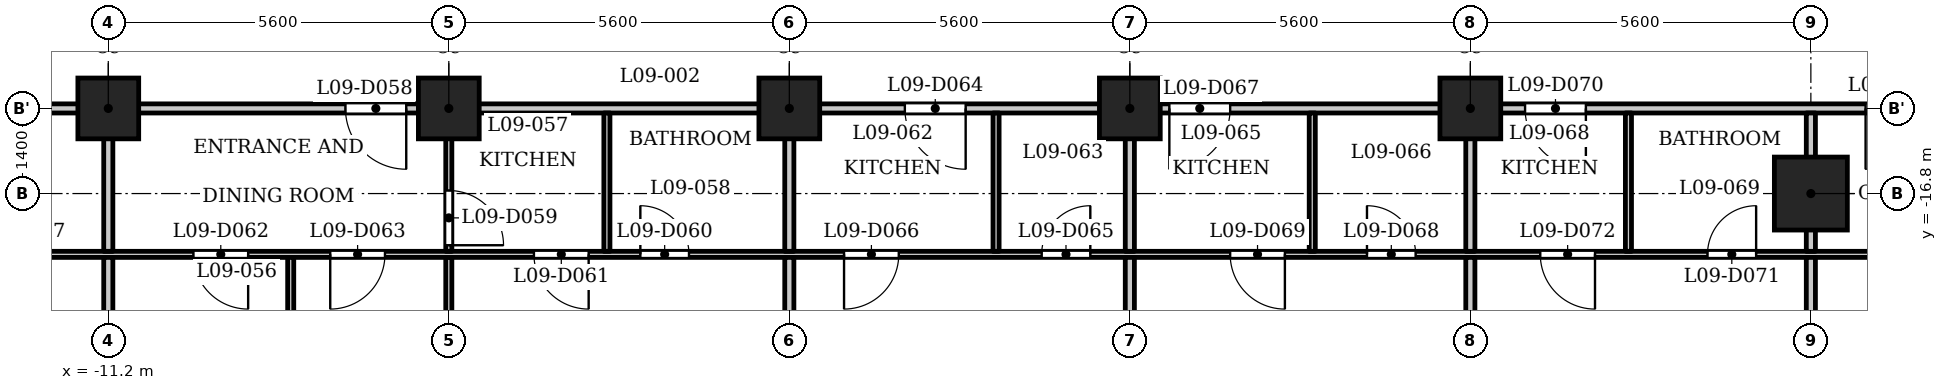
"""IFC4 building model, lengths in metres.
Left out: names, types, materials, properties, quantities, classifications, styles, units other than length and angle.
Written with IfcOpenShell. Run it as: python <this file> out.ifc"""

import sys

from ifc_helpers import new_model, si_unit, direction, frame, frame_2d, origin, origin_2d, place, context, subcontext, project, spatial, rectangle, extrude, element, fill, save


model = new_model("IFC4")
c1 = context("Model", 3, precision=1e-05, world=origin(), true_north=direction((0.0, 1.0)))
c2 = subcontext(c1, "Body", "Model", "MODEL_VIEW")
j1 = project(units=[si_unit("LENGTHUNIT", "METRE"), si_unit("PLANEANGLEUNIT", "RADIAN")], contexts=[c1])
p1 = place(None, origin())
s1 = spatial("IfcSite", under=j1, at=p1, CompositionType="ELEMENT")
p2 = place(p1, origin())
s2 = spatial("IfcBuilding", under=s1, at=p2, CompositionType="ELEMENT")
p3 = place(p2, frame((0.0, 0.0, 41.0)))
s3 = spatial("IfcBuildingStorey", under=s2, at=p3, CompositionType="ELEMENT", Elevation=41.0)
p4 = place(p3, frame((16.8, -16.8, 0.0), z_axis=(0.0, 0.0, 1.0), x_axis=(1.0, 0.0, 0.0)))
e1 = element("IfcColumn", 1, at=p4, inside=s3, PredefinedType="COLUMN", context=c2, shape_type="SweptSolid", body=[
    extrude(rectangle(XDim=1.2, YDim=1.2, at=origin_2d()), origin(), (0.0, 0.0, 1.0), 3.5),
])
for number, where, z_axis, x_axis in (
    (2, (-11.2, -15.4, 0.0), (0.0, 0.0, 1.0), (1.0, 0.0, 0.0)),
    (3, (-5.6, -15.4, 0.0), (0.0, 0.0, 1.0), (1.0, 0.0, 0.0)),
    (4, (0.0, -15.4, 0.0), (0.0, 0.0, 1.0), (1.0, 0.0, 0.0)),
    (5, (5.6, -15.4, 0.0), (0.0, 0.0, 1.0), (1.0, 0.0, 0.0)),
    (6, (11.2, -15.4, 0.0), (0.0, 0.0, 1.0), (1.0, 0.0, 0.0)),
):
    element("IfcColumn", number, at=place(p3, frame(where, z_axis=z_axis, x_axis=x_axis)), inside=s3, PredefinedType="COLUMN", context=c2, shape_type="SweptSolid", body=[
        extrude(rectangle(XDim=1.0, YDim=1.0, at=origin_2d()), origin(), (0.0, 0.0, 1.0), 3.5),
    ])
p5 = place(p3, frame((-26.394, -17.8, 0.0), z_axis=(0.0, 0.0, 1.0), x_axis=(1.0, 0.0, 0.0)))
e7 = element("IfcWall", 7, at=p5, inside=s3, PredefinedType="PARTITIONING", context=c2, shape_type="SweptSolid", body=[
    extrude(rectangle(XDim=53.126, YDim=0.1, at=frame_2d((26.563, 0.0))), origin(), (0.0, 0.0, 1.0), 3.2),
])
p6 = place(p5, frame((0.794, 0.0, 0.0)))
e8 = element("IfcOpeningElement", 8, at=p6, cuts=e7, PredefinedType="OPENING", context=c2, shape_type="SweptSolid", body=[
    extrude(rectangle(XDim=0.8, YDim=2.1, at=frame_2d((0.4, 1.05))), frame((0.0, 0.06, 0.0), z_axis=(0.0, -1.0, 0.0), x_axis=(1.0, 0.0, 0.0)), (0.0, 0.0, 1.0), 0.12),
])
p7 = place(p5, frame((5.644, 0.0, 0.0)))
e9 = element("IfcOpeningElement", 9, at=p7, cuts=e7, PredefinedType="OPENING", context=c2, shape_type="SweptSolid", body=[
    extrude(rectangle(XDim=0.9, YDim=2.1, at=frame_2d((0.45, 1.05))), frame((0.0, 0.06, 0.0), z_axis=(0.0, -1.0, 0.0), x_axis=(1.0, 0.0, 0.0)), (0.0, 0.0, 1.0), 0.12),
])
p8 = place(p5, frame((10.394, 0.0, 0.0)))
e10 = element("IfcOpeningElement", 10, at=p8, cuts=e7, PredefinedType="OPENING", context=c2, shape_type="SweptSolid", body=[
    extrude(rectangle(XDim=0.8, YDim=2.1, at=frame_2d((0.4, 1.05))), frame((0.0, 0.06, 0.0), z_axis=(0.0, -1.0, 0.0), x_axis=(1.0, 0.0, 0.0)), (0.0, 0.0, 1.0), 0.12),
])
p9 = place(p5, frame((13.244, 0.0, 0.0)))
e11 = element("IfcOpeningElement", 11, at=p9, cuts=e7, PredefinedType="OPENING", context=c2, shape_type="SweptSolid", body=[
    extrude(rectangle(XDim=0.9, YDim=2.1, at=frame_2d((0.45, 1.05))), frame((0.0, 0.06, 0.0), z_axis=(0.0, -1.0, 0.0), x_axis=(1.0, 0.0, 0.0)), (0.0, 0.0, 1.0), 0.12),
])
p10 = place(p5, frame((23.944, 0.0, 0.0)))
e12 = element("IfcOpeningElement", 12, at=p10, cuts=e7, PredefinedType="OPENING", context=c2, shape_type="SweptSolid", body=[
    extrude(rectangle(XDim=0.8, YDim=2.1, at=frame_2d((0.4, 1.05))), frame((0.0, 0.06, 0.0), z_axis=(0.0, -1.0, 0.0), x_axis=(1.0, 0.0, 0.0)), (0.0, 0.0, 1.0), 0.12),
])
p11 = place(p5, frame((22.194, 0.0, 0.0)))
e13 = element("IfcOpeningElement", 13, at=p11, cuts=e7, PredefinedType="OPENING", context=c2, shape_type="SweptSolid", body=[
    extrude(rectangle(XDim=0.9, YDim=2.1, at=frame_2d((0.45, 1.05))), frame((0.0, 0.06, 0.0), z_axis=(0.0, -1.0, 0.0), x_axis=(1.0, 0.0, 0.0)), (0.0, 0.0, 1.0), 0.12),
])
p12 = place(p5, frame((16.594, 0.0, 0.0)))
e14 = element("IfcOpeningElement", 14, at=p12, cuts=e7, PredefinedType="OPENING", context=c2, shape_type="SweptSolid", body=[
    extrude(rectangle(XDim=0.9, YDim=2.1, at=frame_2d((0.45, 1.05))), frame((0.0, 0.06, 0.0), z_axis=(0.0, -1.0, 0.0), x_axis=(1.0, 0.0, 0.0)), (0.0, 0.0, 1.0), 0.12),
])
p13 = place(p5, frame((18.844, 0.0, 0.0)))
e15 = element("IfcOpeningElement", 15, at=p13, cuts=e7, PredefinedType="OPENING", context=c2, shape_type="SweptSolid", body=[
    extrude(rectangle(XDim=0.9, YDim=2.1, at=frame_2d((0.45, 1.05))), frame((0.0, 0.06, 0.0), z_axis=(0.0, -1.0, 0.0), x_axis=(1.0, 0.0, 0.0)), (0.0, 0.0, 1.0), 0.12),
])
p14 = place(p5, frame((30.544, 0.0, 0.0)))
e16 = element("IfcOpeningElement", 16, at=p14, cuts=e7, PredefinedType="OPENING", context=c2, shape_type="SweptSolid", body=[
    extrude(rectangle(XDim=0.8, YDim=2.1, at=frame_2d((0.4, 1.05))), frame((0.0, 0.06, 0.0), z_axis=(0.0, -1.0, 0.0), x_axis=(1.0, 0.0, 0.0)), (0.0, 0.0, 1.0), 0.12),
])
p15 = place(p5, frame((27.294, 0.0, 0.0)))
e17 = element("IfcOpeningElement", 17, at=p15, cuts=e7, PredefinedType="OPENING", context=c2, shape_type="SweptSolid", body=[
    extrude(rectangle(XDim=0.9, YDim=2.1, at=frame_2d((0.45, 1.05))), frame((0.0, 0.06, 0.0), z_axis=(0.0, -1.0, 0.0), x_axis=(1.0, 0.0, 0.0)), (0.0, 0.0, 1.0), 0.12),
])
p16 = place(p5, frame((35.894, 0.0, 0.0)))
e18 = element("IfcOpeningElement", 18, at=p16, cuts=e7, PredefinedType="OPENING", context=c2, shape_type="SweptSolid", body=[
    extrude(rectangle(XDim=0.8, YDim=2.1, at=frame_2d((0.4, 1.05))), frame((0.0, 0.06, 0.0), z_axis=(0.0, -1.0, 0.0), x_axis=(1.0, 0.0, 0.0)), (0.0, 0.0, 1.0), 0.12),
])
p17 = place(p5, frame((33.644, 0.0, 0.0)))
e19 = element("IfcOpeningElement", 19, at=p17, cuts=e7, PredefinedType="OPENING", context=c2, shape_type="SweptSolid", body=[
    extrude(rectangle(XDim=0.9, YDim=2.1, at=frame_2d((0.45, 1.05))), frame((0.0, 0.06, 0.0), z_axis=(0.0, -1.0, 0.0), x_axis=(1.0, 0.0, 0.0)), (0.0, 0.0, 1.0), 0.12),
])
p18 = place(p5, frame((41.494, 0.0, 0.0)))
e20 = element("IfcOpeningElement", 20, at=p18, cuts=e7, PredefinedType="OPENING", context=c2, shape_type="SweptSolid", body=[
    extrude(rectangle(XDim=0.8, YDim=2.1, at=frame_2d((0.4, 1.05))), frame((0.0, 0.06, 0.0), z_axis=(0.0, -1.0, 0.0), x_axis=(1.0, 0.0, 0.0)), (0.0, 0.0, 1.0), 0.12),
])
p19 = place(p5, frame((38.744, 0.0, 0.0)))
e21 = element("IfcOpeningElement", 21, at=p19, cuts=e7, PredefinedType="OPENING", context=c2, shape_type="SweptSolid", body=[
    extrude(rectangle(XDim=0.9, YDim=2.1, at=frame_2d((0.45, 1.05))), frame((0.0, 0.06, 0.0), z_axis=(0.0, -1.0, 0.0), x_axis=(1.0, 0.0, 0.0)), (0.0, 0.0, 1.0), 0.12),
])
p20 = place(p5, frame((49.362, 0.0, 0.0)))
e22 = element("IfcOpeningElement", 22, at=p20, cuts=e7, PredefinedType="OPENING", context=c2, shape_type="SweptSolid", body=[
    extrude(rectangle(XDim=0.8, YDim=2.1, at=frame_2d((0.4, 1.05))), frame((0.0, 0.06, 0.0), z_axis=(0.0, -1.0, 0.0), x_axis=(1.0, 0.0, 0.0)), (0.0, 0.0, 1.0), 0.12),
])
p21 = place(p5, frame((45.094, 0.0, 0.0)))
e23 = element("IfcOpeningElement", 23, at=p21, cuts=e7, PredefinedType="OPENING", context=c2, shape_type="SweptSolid", body=[
    extrude(rectangle(XDim=0.9, YDim=2.1, at=frame_2d((0.45, 1.05))), frame((0.0, 0.06, 0.0), z_axis=(0.0, -1.0, 0.0), x_axis=(1.0, 0.0, 0.0)), (0.0, 0.0, 1.0), 0.12),
])
p22 = place(p3, frame((-27.484, -15.4, 0.0), z_axis=(0.0, 0.0, 1.0), x_axis=(1.0, 0.0, 0.0)))
e24 = element("IfcWall", 24, at=p22, inside=s3, PredefinedType="PARTITIONING", context=c2, shape_type="SweptSolid", body=[
    extrude(rectangle(XDim=54.968, YDim=0.15, at=frame_2d((27.484, 0.0))), origin(), (0.0, 0.0, 1.0), 3.2),
])
p23 = place(p22, frame((5.734, 0.0, 0.0)))
e25 = element("IfcOpeningElement", 25, at=p23, cuts=e24, PredefinedType="OPENING", context=c2, shape_type="SweptSolid", body=[
    extrude(rectangle(XDim=1.0, YDim=2.1, at=frame_2d((0.5, 1.05))), frame((0.0, 0.085, 0.0), z_axis=(0.0, -1.0, 0.0), x_axis=(1.0, 0.0, 0.0)), (0.0, 0.0, 1.0), 0.17),
])
p24 = place(p22, frame((13.334, 0.0, 0.0)))
e26 = element("IfcOpeningElement", 26, at=p24, cuts=e24, PredefinedType="OPENING", context=c2, shape_type="SweptSolid", body=[
    extrude(rectangle(XDim=1.0, YDim=2.1, at=frame_2d((0.5, 1.05))), frame((0.0, 0.085, 0.0), z_axis=(0.0, -1.0, 0.0), x_axis=(1.0, 0.0, 0.0)), (0.0, 0.0, 1.0), 0.17),
])
p25 = place(p22, frame((20.184, 0.0, 0.0)))
e27 = element("IfcOpeningElement", 27, at=p25, cuts=e24, PredefinedType="OPENING", context=c2, shape_type="SweptSolid", body=[
    extrude(rectangle(XDim=1.0, YDim=2.1, at=frame_2d((0.5, 1.05))), frame((0.0, 0.085, 0.0), z_axis=(0.0, -1.0, 0.0), x_axis=(1.0, 0.0, 0.0)), (0.0, 0.0, 1.0), 0.17),
])
p26 = place(p22, frame((29.384, 0.0, 0.0)))
e28 = element("IfcOpeningElement", 28, at=p26, cuts=e24, PredefinedType="OPENING", context=c2, shape_type="SweptSolid", body=[
    extrude(rectangle(XDim=1.0, YDim=2.1, at=frame_2d((0.5, 1.05))), frame((0.0, 0.085, 0.0), z_axis=(0.0, -1.0, 0.0), x_axis=(1.0, 0.0, 0.0)), (0.0, 0.0, 1.0), 0.17),
])
p27 = place(p22, frame((33.734, 0.0, 0.0)))
e29 = element("IfcOpeningElement", 29, at=p27, cuts=e24, PredefinedType="OPENING", context=c2, shape_type="SweptSolid", body=[
    extrude(rectangle(XDim=1.0, YDim=2.1, at=frame_2d((0.5, 1.05))), frame((0.0, 0.085, 0.0), z_axis=(0.0, -1.0, 0.0), x_axis=(1.0, 0.0, 0.0)), (0.0, 0.0, 1.0), 0.17),
])
p28 = place(p22, frame((39.584, 0.0, 0.0)))
e30 = element("IfcOpeningElement", 30, at=p28, cuts=e24, PredefinedType="OPENING", context=c2, shape_type="SweptSolid", body=[
    extrude(rectangle(XDim=1.0, YDim=2.1, at=frame_2d((0.5, 1.05))), frame((0.0, 0.085, 0.0), z_axis=(0.0, -1.0, 0.0), x_axis=(1.0, 0.0, 0.0)), (0.0, 0.0, 1.0), 0.17),
])
p29 = place(p22, frame((45.184, 0.0, 0.0)))
e31 = element("IfcOpeningElement", 31, at=p29, cuts=e24, PredefinedType="OPENING", context=c2, shape_type="SweptSolid", body=[
    extrude(rectangle(XDim=1.0, YDim=2.1, at=frame_2d((0.5, 1.05))), frame((0.0, 0.085, 0.0), z_axis=(0.0, -1.0, 0.0), x_axis=(1.0, 0.0, 0.0)), (0.0, 0.0, 1.0), 0.17),
])
p30 = place(p3, frame((-11.2, -23.13, 0.0), z_axis=(0.0, 0.0, 1.0), x_axis=(0.0, 1.0, 0.0)))
e32 = element("IfcWall", 32, at=p30, inside=s3, PredefinedType="PARTITIONING", context=c2, shape_type="SweptSolid", body=[
    extrude(rectangle(XDim=5.28, YDim=0.15, at=frame_2d((2.64, 0.0))), origin(), (0.0, 0.0, 1.0), 3.2),
])
p31 = place(p3, frame((-11.2, -17.75, 0.0), z_axis=(0.0, 0.0, 1.0), x_axis=(0.0, 1.0, 0.0)))
e33 = element("IfcWall", 33, at=p31, inside=s3, PredefinedType="PARTITIONING", context=c2, shape_type="SweptSolid", body=[
    extrude(rectangle(XDim=2.275, YDim=0.15, at=frame_2d((1.137, 0.0))), origin(), (0.0, 0.0, 1.0), 3.2),
])
p32 = place(p3, frame((-8.2, -22.08, 0.0), z_axis=(0.0, 0.0, 1.0), x_axis=(0.0, 1.0, 0.0)))
e34 = element("IfcWall", 34, at=p32, inside=s3, PredefinedType="PARTITIONING", context=c2, shape_type="SweptSolid", body=[
    extrude(rectangle(XDim=4.23, YDim=0.1, at=frame_2d((2.115, 0.0))), origin(), (0.0, 0.0, 1.0), 3.2),
])
p33 = place(p3, frame((-5.6, -23.13, 0.0), z_axis=(0.0, 0.0, 1.0), x_axis=(0.0, 1.0, 0.0)))
e35 = element("IfcWall", 35, at=p33, inside=s3, PredefinedType="PARTITIONING", context=c2, shape_type="SweptSolid", body=[
    extrude(rectangle(XDim=5.28, YDim=0.1, at=frame_2d((2.64, 0.0))), origin(), (0.0, 0.0, 1.0), 3.2),
])
p34 = place(p3, frame((-5.6, -17.75, 0.0), z_axis=(0.0, 0.0, 1.0), x_axis=(0.0, 1.0, 0.0)))
e36 = element("IfcWall", 36, at=p34, inside=s3, PredefinedType="PARTITIONING", context=c2, shape_type="SweptSolid", body=[
    extrude(rectangle(XDim=2.275, YDim=0.1, at=frame_2d((1.137, 0.0))), origin(), (0.0, 0.0, 1.0), 3.2),
])
p35 = place(p34, frame((0.1, 0.0, 0.0)))
e37 = element("IfcOpeningElement", 37, at=p35, cuts=e36, PredefinedType="OPENING", context=c2, shape_type="SweptSolid", body=[
    extrude(rectangle(XDim=0.9, YDim=2.1, at=frame_2d((0.45, 1.05))), frame((0.0, 0.06, 0.0), z_axis=(0.0, -1.0, 0.0), x_axis=(1.0, 0.0, 0.0)), (0.0, 0.0, 1.0), 0.12),
])
p36 = place(p3, frame((-3.0, -17.75, 0.0), z_axis=(0.0, 0.0, 1.0), x_axis=(0.0, 1.0, 0.0)))
e38 = element("IfcWall", 38, at=p36, inside=s3, PredefinedType="PARTITIONING", context=c2, shape_type="SweptSolid", body=[
    extrude(rectangle(XDim=2.275, YDim=0.1, at=frame_2d((1.137, 0.0))), origin(), (0.0, 0.0, 1.0), 3.2),
])
p37 = place(p3, frame((0.0, -23.13, 0.0), z_axis=(0.0, 0.0, 1.0), x_axis=(0.0, 1.0, 0.0)))
e39 = element("IfcWall", 39, at=p37, inside=s3, PredefinedType="PARTITIONING", context=c2, shape_type="SweptSolid", body=[
    extrude(rectangle(XDim=5.28, YDim=0.15, at=frame_2d((2.64, 0.0))), origin(), (0.0, 0.0, 1.0), 3.2),
])
p38 = place(p3, frame((0.0, -17.75, 0.0), z_axis=(0.0, 0.0, 1.0), x_axis=(0.0, 1.0, 0.0)))
e40 = element("IfcWall", 40, at=p38, inside=s3, PredefinedType="PARTITIONING", context=c2, shape_type="SweptSolid", body=[
    extrude(rectangle(XDim=2.275, YDim=0.15, at=frame_2d((1.137, 0.0))), origin(), (0.0, 0.0, 1.0), 3.2),
])
p39 = place(p3, frame((3.4, -17.75, 0.0), z_axis=(0.0, 0.0, 1.0), x_axis=(0.0, 1.0, 0.0)))
e41 = element("IfcWall", 41, at=p39, inside=s3, PredefinedType="PARTITIONING", context=c2, shape_type="SweptSolid", body=[
    extrude(rectangle(XDim=2.275, YDim=0.1, at=frame_2d((1.137, 0.0))), origin(), (0.0, 0.0, 1.0), 3.2),
])
p40 = place(p3, frame((5.6, -23.13, 0.0), z_axis=(0.0, 0.0, 1.0), x_axis=(0.0, 1.0, 0.0)))
e42 = element("IfcWall", 42, at=p40, inside=s3, PredefinedType="PARTITIONING", context=c2, shape_type="SweptSolid", body=[
    extrude(rectangle(XDim=5.28, YDim=0.15, at=frame_2d((2.64, 0.0))), origin(), (0.0, 0.0, 1.0), 3.2),
])
p41 = place(p3, frame((5.6, -17.75, 0.0), z_axis=(0.0, 0.0, 1.0), x_axis=(0.0, 1.0, 0.0)))
e43 = element("IfcWall", 43, at=p41, inside=s3, PredefinedType="PARTITIONING", context=c2, shape_type="SweptSolid", body=[
    extrude(rectangle(XDim=2.275, YDim=0.15, at=frame_2d((1.137, 0.0))), origin(), (0.0, 0.0, 1.0), 3.2),
])
p42 = place(p3, frame((8.6, -17.75, 0.0), z_axis=(0.0, 0.0, 1.0), x_axis=(0.0, 1.0, 0.0)))
e44 = element("IfcWall", 44, at=p42, inside=s3, PredefinedType="PARTITIONING", context=c2, shape_type="SweptSolid", body=[
    extrude(rectangle(XDim=2.275, YDim=0.1, at=frame_2d((1.137, 0.0))), origin(), (0.0, 0.0, 1.0), 3.2),
])
p43 = place(p3, frame((11.2, -23.13, 0.0), z_axis=(0.0, 0.0, 1.0), x_axis=(0.0, 1.0, 0.0)))
e45 = element("IfcWall", 45, at=p43, inside=s3, PredefinedType="PARTITIONING", context=c2, shape_type="SweptSolid", body=[
    extrude(rectangle(XDim=5.28, YDim=0.15, at=frame_2d((2.64, 0.0))), origin(), (0.0, 0.0, 1.0), 3.2),
])
p44 = place(p3, frame((11.2, -17.75, 0.0), z_axis=(0.0, 0.0, 1.0), x_axis=(0.0, 1.0, 0.0)))
e46 = element("IfcWall", 46, at=p44, inside=s3, PredefinedType="PARTITIONING", context=c2, shape_type="SweptSolid", body=[
    extrude(rectangle(XDim=2.275, YDim=0.15, at=frame_2d((1.137, 0.0))), origin(), (0.0, 0.0, 1.0), 3.2),
])
p45 = place(p3, frame((13.8, -17.75, 0.0), z_axis=(0.0, 0.0, 1.0), x_axis=(0.0, 1.0, 0.0)))
e47 = element("IfcWall", 47, at=p45, inside=s3, PredefinedType="PARTITIONING", context=c2, shape_type="SweptSolid", body=[
    extrude(rectangle(XDim=2.275, YDim=0.1, at=frame_2d((1.137, 0.0))), origin(), (0.0, 0.0, 1.0), 3.2),
])
p46 = place(p3, frame((16.8, -23.13, 0.0), z_axis=(0.0, 0.0, 1.0), x_axis=(0.0, 1.0, 0.0)))
e48 = element("IfcWall", 48, at=p46, inside=s3, PredefinedType="PARTITIONING", context=c2, shape_type="SweptSolid", body=[
    extrude(rectangle(XDim=5.28, YDim=0.15, at=frame_2d((2.64, 0.0))), origin(), (0.0, 0.0, 1.0), 3.2),
])
p47 = place(p3, frame((16.8, -17.75, 0.0), z_axis=(0.0, 0.0, 1.0), x_axis=(0.0, 1.0, 0.0)))
e49 = element("IfcWall", 49, at=p47, inside=s3, PredefinedType="PARTITIONING", context=c2, shape_type="SweptSolid", body=[
    extrude(rectangle(XDim=2.275, YDim=0.15, at=frame_2d((1.137, 0.0))), origin(), (0.0, 0.0, 1.0), 3.2),
])
p48 = place(p25, origin())
e50 = element("IfcDoor", 50, at=p48, inside=s3, OperationType="SINGLE_SWING_RIGHT", PredefinedType="DOOR", context=c2, shape_type="SweptSolid", body=[
    extrude(rectangle(XDim=1.0, YDim=2.1, at=frame_2d((0.5, 1.05))), frame((0.0, 0.025, 0.0), z_axis=(0.0, -1.0, 0.0), x_axis=(1.0, 0.0, 0.0)), (0.0, 0.0, 1.0), 0.05),
])
fill(e27, e50)
p49 = place(p35, origin())
e51 = element("IfcDoor", 51, at=p49, inside=s3, OperationType="SINGLE_SWING_LEFT", PredefinedType="DOOR", context=c2, shape_type="SweptSolid", body=[
    extrude(rectangle(XDim=0.9, YDim=2.1, at=frame_2d((0.45, 1.05))), frame((0.0, 0.025, 0.0), z_axis=(0.0, -1.0, 0.0), x_axis=(1.0, 0.0, 0.0)), (0.0, 0.0, 1.0), 0.05),
])
fill(e37, e51)
p50 = place(p10, origin())
e52 = element("IfcDoor", 52, at=p50, inside=s3, OperationType="SINGLE_SWING_RIGHT", PredefinedType="DOOR", context=c2, shape_type="SweptSolid", body=[
    extrude(rectangle(XDim=0.8, YDim=2.1, at=frame_2d((0.4, 1.05))), frame((0.0, 0.025, 0.0), z_axis=(0.0, -1.0, 0.0), x_axis=(1.0, 0.0, 0.0)), (0.0, 0.0, 1.0), 0.05),
])
fill(e12, e52)
p51 = place(p11, origin())
e53 = element("IfcDoor", 53, at=p51, inside=s3, OperationType="SINGLE_SWING_RIGHT", PredefinedType="DOOR", context=c2, shape_type="SweptSolid", body=[
    extrude(rectangle(XDim=0.9, YDim=2.1, at=frame_2d((0.45, 1.05))), frame((0.0, 0.025, 0.0), z_axis=(0.0, -1.0, 0.0), x_axis=(1.0, 0.0, 0.0)), (0.0, 0.0, 1.0), 0.05),
])
fill(e13, e53)
p52 = place(p12, origin())
e54 = element("IfcDoor", 54, at=p52, inside=s3, OperationType="SINGLE_SWING_RIGHT", PredefinedType="DOOR", context=c2, shape_type="SweptSolid", body=[
    extrude(rectangle(XDim=0.9, YDim=2.1, at=frame_2d((0.45, 1.05))), frame((0.0, 0.025, 0.0), z_axis=(0.0, -1.0, 0.0), x_axis=(1.0, 0.0, 0.0)), (0.0, 0.0, 1.0), 0.05),
])
fill(e14, e54)
p53 = place(p13, origin())
e55 = element("IfcDoor", 55, at=p53, inside=s3, OperationType="SINGLE_SWING_LEFT", PredefinedType="DOOR", context=c2, shape_type="SweptSolid", body=[
    extrude(rectangle(XDim=0.9, YDim=2.1, at=frame_2d((0.45, 1.05))), frame((0.0, 0.025, 0.0), z_axis=(0.0, -1.0, 0.0), x_axis=(1.0, 0.0, 0.0)), (0.0, 0.0, 1.0), 0.05),
])
fill(e15, e55)
p54 = place(p26, origin())
e56 = element("IfcDoor", 56, at=p54, inside=s3, OperationType="SINGLE_SWING_RIGHT", PredefinedType="DOOR", context=c2, shape_type="SweptSolid", body=[
    extrude(rectangle(XDim=1.0, YDim=2.1, at=frame_2d((0.5, 1.05))), frame((0.0, 0.025, 0.0), z_axis=(0.0, -1.0, 0.0), x_axis=(1.0, 0.0, 0.0)), (0.0, 0.0, 1.0), 0.05),
])
fill(e28, e56)
p55 = place(p14, origin())
e57 = element("IfcDoor", 57, at=p55, inside=s3, OperationType="SINGLE_SWING_LEFT", PredefinedType="DOOR", context=c2, shape_type="SweptSolid", body=[
    extrude(rectangle(XDim=0.8, YDim=2.1, at=frame_2d((0.4, 1.05))), frame((0.0, 0.025, 0.0), z_axis=(0.0, -1.0, 0.0), x_axis=(1.0, 0.0, 0.0)), (0.0, 0.0, 1.0), 0.05),
])
fill(e16, e57)
p56 = place(p15, origin())
e58 = element("IfcDoor", 58, at=p56, inside=s3, OperationType="SINGLE_SWING_LEFT", PredefinedType="DOOR", context=c2, shape_type="SweptSolid", body=[
    extrude(rectangle(XDim=0.9, YDim=2.1, at=frame_2d((0.45, 1.05))), frame((0.0, 0.025, 0.0), z_axis=(0.0, -1.0, 0.0), x_axis=(1.0, 0.0, 0.0)), (0.0, 0.0, 1.0), 0.05),
])
fill(e17, e58)
p57 = place(p27, origin())
e59 = element("IfcDoor", 59, at=p57, inside=s3, OperationType="SINGLE_SWING_LEFT", PredefinedType="DOOR", context=c2, shape_type="SweptSolid", body=[
    extrude(rectangle(XDim=1.0, YDim=2.1, at=frame_2d((0.5, 1.05))), frame((0.0, 0.025, 0.0), z_axis=(0.0, -1.0, 0.0), x_axis=(1.0, 0.0, 0.0)), (0.0, 0.0, 1.0), 0.05),
])
fill(e29, e59)
p58 = place(p16, origin())
e60 = element("IfcDoor", 60, at=p58, inside=s3, OperationType="SINGLE_SWING_RIGHT", PredefinedType="DOOR", context=c2, shape_type="SweptSolid", body=[
    extrude(rectangle(XDim=0.8, YDim=2.1, at=frame_2d((0.4, 1.05))), frame((0.0, 0.025, 0.0), z_axis=(0.0, -1.0, 0.0), x_axis=(1.0, 0.0, 0.0)), (0.0, 0.0, 1.0), 0.05),
])
fill(e18, e60)
p59 = place(p17, origin())
e61 = element("IfcDoor", 61, at=p59, inside=s3, OperationType="SINGLE_SWING_RIGHT", PredefinedType="DOOR", context=c2, shape_type="SweptSolid", body=[
    extrude(rectangle(XDim=0.9, YDim=2.1, at=frame_2d((0.45, 1.05))), frame((0.0, 0.025, 0.0), z_axis=(0.0, -1.0, 0.0), x_axis=(1.0, 0.0, 0.0)), (0.0, 0.0, 1.0), 0.05),
])
fill(e19, e61)
p60 = place(p28, origin())
e62 = element("IfcDoor", 62, at=p60, inside=s3, OperationType="SINGLE_SWING_RIGHT", PredefinedType="DOOR", context=c2, shape_type="SweptSolid", body=[
    extrude(rectangle(XDim=1.0, YDim=2.1, at=frame_2d((0.5, 1.05))), frame((0.0, 0.025, 0.0), z_axis=(0.0, -1.0, 0.0), x_axis=(1.0, 0.0, 0.0)), (0.0, 0.0, 1.0), 0.05),
])
fill(e30, e62)
p61 = place(p18, origin())
e63 = element("IfcDoor", 63, at=p61, inside=s3, OperationType="SINGLE_SWING_LEFT", PredefinedType="DOOR", context=c2, shape_type="SweptSolid", body=[
    extrude(rectangle(XDim=0.8, YDim=2.1, at=frame_2d((0.4, 1.05))), frame((0.0, 0.025, 0.0), z_axis=(0.0, -1.0, 0.0), x_axis=(1.0, 0.0, 0.0)), (0.0, 0.0, 1.0), 0.05),
])
fill(e20, e63)
p62 = place(p19, origin())
e64 = element("IfcDoor", 64, at=p62, inside=s3, OperationType="SINGLE_SWING_RIGHT", PredefinedType="DOOR", context=c2, shape_type="SweptSolid", body=[
    extrude(rectangle(XDim=0.9, YDim=2.1, at=frame_2d((0.45, 1.05))), frame((0.0, 0.025, 0.0), z_axis=(0.0, -1.0, 0.0), x_axis=(1.0, 0.0, 0.0)), (0.0, 0.0, 1.0), 0.05),
])
fill(e21, e64)
p63 = place(p29, origin())
e65 = element("IfcDoor", 65, at=p63, inside=s3, OperationType="SINGLE_SWING_LEFT", PredefinedType="DOOR", context=c2, shape_type="SweptSolid", body=[
    extrude(rectangle(XDim=1.0, YDim=2.1, at=frame_2d((0.5, 1.05))), frame((0.0, 0.025, 0.0), z_axis=(0.0, -1.0, 0.0), x_axis=(1.0, 0.0, 0.0)), (0.0, 0.0, 1.0), 0.05),
])
fill(e31, e65)
save(model, sys.argv[1])
